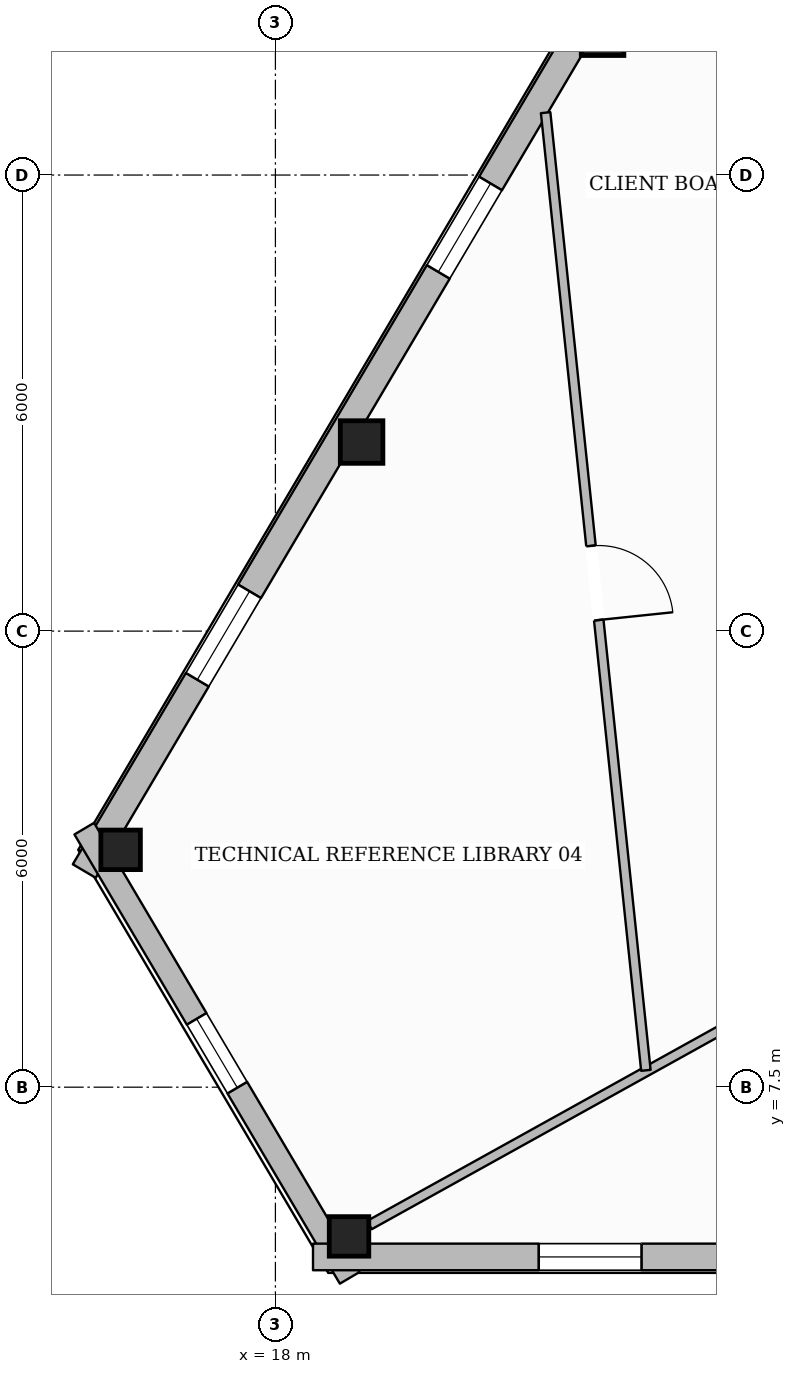
"""IFC4 building model, lengths in metres.
Left out: names, types, materials, properties, quantities, classifications, styles, units other than length and angle.
Written with IfcOpenShell. Run it as: python <this file> out.ifc"""

import sys

from ifc_helpers import new_model, si_unit, direction, frame, frame_2d, origin, origin_2d, place, context, subcontext, project, spatial, rectangle, hollow_rectangle, extrude, element, fill, save


model = new_model("IFC4")
c1 = context("Model", 3, precision=1e-05, world=origin(), true_north=direction((0.0, 1.0)))
c2 = subcontext(c1, "Body", "Model", "MODEL_VIEW")
j1 = project(units=[si_unit("LENGTHUNIT", "METRE"), si_unit("PLANEANGLEUNIT", "RADIAN")], contexts=[c1])
p1 = place(None, origin())
s1 = spatial("IfcSite", under=j1, at=p1, CompositionType="ELEMENT")
p2 = place(p1, origin())
s2 = spatial("IfcBuilding", under=s1, at=p2, CompositionType="ELEMENT")
p3 = place(p2, frame((0.0, 0.0, 274.15)))
s3 = spatial("IfcBuildingStorey", under=s2, at=p3, CompositionType="ELEMENT", Elevation=274.15)
for number, where, z_axis, x_axis in (
    (1, (22.304, 21.353, 0.0), (0.0, 0.0, 1.0), (1.0, 0.0, 0.0)),
    (2, (19.134, 15.988, 0.0), (0.0, 0.0, 1.0), (1.0, 0.0, 0.0)),
):
    element("IfcColumn", number, at=place(p3, frame(where, z_axis=z_axis, x_axis=x_axis)), inside=s3, PredefinedType="COLUMN", context=c2, shape_type="SweptSolid", body=[
        extrude(hollow_rectangle(XDim=0.56, YDim=0.56, WallThickness=0.025, at=origin_2d()), origin(), (0.0, 0.0, 1.0), 3.61),
    ])
for number, where, z_axis, x_axis in (
    (3, (15.964, 10.622, 0.0), (0.0, 0.0, 1.0), (1.0, 0.0, 0.0)),
    (4, (18.969, 5.537, 0.0), (0.0, 0.0, 1.0), (1.0, 0.0, 0.0)),
):
    element("IfcColumn", number, at=place(p3, frame(where, z_axis=z_axis, x_axis=x_axis)), inside=s3, PredefinedType="COLUMN", context=c2, shape_type="SweptSolid", body=[
        extrude(hollow_rectangle(XDim=0.52, YDim=0.52, WallThickness=0.024, at=origin_2d()), origin(), (0.0, 0.0, 1.0), 3.61),
    ])
p4 = place(p3, frame((15.485, 10.343, 0.0), z_axis=(0.0, 0.0, 1.0), x_axis=(0.508715156146, 0.860934892955, 0.0)))
e5 = element("IfcWall", 5, at=p4, inside=s3, PredefinedType="STANDARD", context=c2, shape_type="SweptSolid", body=[
    extrude(rectangle(XDim=38.349, YDim=0.35, at=frame_2d((19.175, 0.0))), origin(), (0.0, 0.0, 1.0), 3.196),
])
p5 = place(p4, frame((34.084, 0.0, 0.65)))
e6 = element("IfcOpeningElement", 6, at=p5, cuts=e5, PredefinedType="OPENING", context=c2, shape_type="SweptSolid", body=[
    extrude(rectangle(XDim=1.35, YDim=1.75, at=frame_2d((0.675, 0.875))), frame((0.0, 0.185, 0.0), z_axis=(0.0, -1.0, 0.0), x_axis=(1.0, 0.0, 0.0)), (0.0, 0.0, 1.0), 0.37),
])
p6 = place(p4, frame((27.852, 0.0, 0.65)))
e7 = element("IfcOpeningElement", 7, at=p6, cuts=e5, PredefinedType="OPENING", context=c2, shape_type="SweptSolid", body=[
    extrude(rectangle(XDim=1.35, YDim=1.75, at=frame_2d((0.675, 0.875))), frame((0.0, 0.185, 0.0), z_axis=(0.0, -1.0, 0.0), x_axis=(1.0, 0.0, 0.0)), (0.0, 0.0, 1.0), 0.37),
])
p7 = place(p4, frame((15.388, 0.0, 0.65)))
e8 = element("IfcOpeningElement", 8, at=p7, cuts=e5, PredefinedType="OPENING", context=c2, shape_type="SweptSolid", body=[
    extrude(rectangle(XDim=1.35, YDim=1.75, at=frame_2d((0.675, 0.875))), frame((0.0, 0.185, 0.0), z_axis=(0.0, -1.0, 0.0), x_axis=(1.0, 0.0, 0.0)), (0.0, 0.0, 1.0), 0.37),
])
p8 = place(p4, frame((9.156, 0.0, 0.65)))
e9 = element("IfcOpeningElement", 9, at=p8, cuts=e5, PredefinedType="OPENING", context=c2, shape_type="SweptSolid", body=[
    extrude(rectangle(XDim=1.35, YDim=1.75, at=frame_2d((0.675, 0.875))), frame((0.0, 0.185, 0.0), z_axis=(0.0, -1.0, 0.0), x_axis=(1.0, 0.0, 0.0)), (0.0, 0.0, 1.0), 0.37),
])
p9 = place(p4, frame((2.925, 0.0, 0.65)))
e10 = element("IfcOpeningElement", 10, at=p9, cuts=e5, PredefinedType="OPENING", context=c2, shape_type="SweptSolid", body=[
    extrude(rectangle(XDim=1.35, YDim=1.75, at=frame_2d((0.675, 0.875))), frame((0.0, 0.185, 0.0), z_axis=(0.0, -1.0, 0.0), x_axis=(1.0, 0.0, 0.0)), (0.0, 0.0, 1.0), 0.37),
])
p10 = place(p3, frame((18.977, 4.991, 0.0), z_axis=(0.0, 0.0, 1.0), x_axis=(-0.508725717469, 0.86092865232, 0.0)))
e11 = element("IfcWall", 11, at=p10, inside=s3, PredefinedType="STANDARD", context=c2, shape_type="SweptSolid", body=[
    extrude(rectangle(XDim=6.865, YDim=0.3, at=frame_2d((3.432, 0.0))), origin(), (0.0, 0.0, 1.0), 3.196),
])
p11 = place(p10, frame((2.907, 0.0, 0.65)))
e12 = element("IfcOpeningElement", 12, at=p11, cuts=e11, PredefinedType="OPENING", context=c2, shape_type="SweptSolid", body=[
    extrude(rectangle(XDim=1.05, YDim=1.7, at=frame_2d((0.525, 0.85))), frame((0.0, 0.16, 0.0), z_axis=(0.0, -1.0, 0.0), x_axis=(1.0, 0.0, 0.0)), (0.0, 0.0, 1.0), 0.32),
])
p12 = place(p3, frame((57.505, 5.267, 0.0), z_axis=(0.0, 0.0, 1.0), x_axis=(-1.0, 0.0, 0.0)))
e13 = element("IfcWall", 13, at=p12, inside=s3, PredefinedType="STANDARD", context=c2, shape_type="SweptSolid", body=[
    extrude(rectangle(XDim=39.011, YDim=0.35, at=frame_2d((19.505, 0.0))), origin(), (0.0, 0.0, 1.0), 3.196),
])
p13 = place(p12, frame((34.69, 0.0, 0.65)))
e14 = element("IfcOpeningElement", 14, at=p13, cuts=e13, PredefinedType="OPENING", context=c2, shape_type="SweptSolid", body=[
    extrude(rectangle(XDim=1.35, YDim=1.75, at=frame_2d((0.675, 0.875))), frame((0.0, 0.185, 0.0), z_axis=(0.0, -1.0, 0.0), x_axis=(1.0, 0.0, 0.0)), (0.0, 0.0, 1.0), 0.37),
])
p14 = place(p12, frame((28.346, 0.0, 0.65)))
e15 = element("IfcOpeningElement", 15, at=p14, cuts=e13, PredefinedType="OPENING", context=c2, shape_type="SweptSolid", body=[
    extrude(rectangle(XDim=1.35, YDim=1.75, at=frame_2d((0.675, 0.875))), frame((0.0, 0.185, 0.0), z_axis=(0.0, -1.0, 0.0), x_axis=(1.0, 0.0, 0.0)), (0.0, 0.0, 1.0), 0.37),
])
p15 = place(p12, frame((15.658, 0.0, 0.65)))
e16 = element("IfcOpeningElement", 16, at=p15, cuts=e13, PredefinedType="OPENING", context=c2, shape_type="SweptSolid", body=[
    extrude(rectangle(XDim=1.35, YDim=1.75, at=frame_2d((0.675, 0.875))), frame((0.0, 0.185, 0.0), z_axis=(0.0, -1.0, 0.0), x_axis=(1.0, 0.0, 0.0)), (0.0, 0.0, 1.0), 0.37),
])
p16 = place(p12, frame((9.315, 0.0, 0.65)))
e17 = element("IfcOpeningElement", 17, at=p16, cuts=e13, PredefinedType="OPENING", context=c2, shape_type="SweptSolid", body=[
    extrude(rectangle(XDim=1.35, YDim=1.75, at=frame_2d((0.675, 0.875))), frame((0.0, 0.185, 0.0), z_axis=(0.0, -1.0, 0.0), x_axis=(1.0, 0.0, 0.0)), (0.0, 0.0, 1.0), 0.37),
])
p17 = place(p12, frame((2.971, 0.0, 0.65)))
e18 = element("IfcOpeningElement", 18, at=p17, cuts=e13, PredefinedType="OPENING", context=c2, shape_type="SweptSolid", body=[
    extrude(rectangle(XDim=1.35, YDim=1.75, at=frame_2d((0.675, 0.875))), frame((0.0, 0.185, 0.0), z_axis=(0.0, -1.0, 0.0), x_axis=(1.0, 0.0, 0.0)), (0.0, 0.0, 1.0), 0.37),
])
p18 = place(p3, frame((26.01, 9.445, 0.0), z_axis=(0.0, 0.0, 1.0), x_axis=(-0.874347500964, -0.485300368389, 0.0)))
e19 = element("IfcWall", 19, at=p18, inside=s3, PredefinedType="PARTITIONING", context=c2, shape_type="SweptSolid", body=[
    extrude(rectangle(XDim=7.746, YDim=0.125, at=frame_2d((3.873, 0.0))), origin(), (0.0, 0.0, 1.0), 3.246),
])
p19 = place(p3, frame((21.555, 20.321, 0.0), z_axis=(0.0, 0.0, 1.0), x_axis=(0.104108921444, -0.994565901525, 0.0)))
e20 = element("IfcWall", 20, at=p19, inside=s3, PredefinedType="PARTITIONING", context=c2, shape_type="SweptSolid", body=[
    extrude(rectangle(XDim=12.668, YDim=0.125, at=frame_2d((6.334, 0.0))), origin(), (0.0, 0.0, 1.0), 3.349),
])
p20 = place(p19, frame((5.731, 0.0, 0.0)))
e21 = element("IfcOpeningElement", 21, at=p20, cuts=e20, PredefinedType="OPENING", context=c2, shape_type="SweptSolid", body=[
    extrude(rectangle(XDim=0.98, YDim=2.15, at=frame_2d((0.49, 1.075))), frame((0.0, 0.073, 0.0), z_axis=(0.0, -1.0, 0.0), x_axis=(1.0, 0.0, 0.0)), (0.0, 0.0, 1.0), 0.145),
])
p21 = place(p8, origin())
e22 = element("IfcWindow", 22, at=p21, inside=s3, PartitioningType="SINGLE_PANEL", PredefinedType="WINDOW", context=c2, shape_type="SweptSolid", body=[
    extrude(rectangle(XDim=1.35, YDim=1.75, at=frame_2d((0.675, 0.875))), frame((0.0, 0.03, 0.0), z_axis=(0.0, -1.0, 0.0), x_axis=(1.0, 0.0, 0.0)), (0.0, 0.0, 1.0), 0.06),
])
fill(e9, e22)
p22 = place(p9, origin())
e23 = element("IfcWindow", 23, at=p22, inside=s3, PartitioningType="SINGLE_PANEL", PredefinedType="WINDOW", context=c2, shape_type="SweptSolid", body=[
    extrude(rectangle(XDim=1.35, YDim=1.75, at=frame_2d((0.675, 0.875))), frame((0.0, 0.03, 0.0), z_axis=(0.0, -1.0, 0.0), x_axis=(1.0, 0.0, 0.0)), (0.0, 0.0, 1.0), 0.06),
])
fill(e10, e23)
p23 = place(p13, origin())
e24 = element("IfcWindow", 24, at=p23, inside=s3, PartitioningType="SINGLE_PANEL", PredefinedType="WINDOW", context=c2, shape_type="SweptSolid", body=[
    extrude(rectangle(XDim=1.35, YDim=1.75, at=frame_2d((0.675, 0.875))), frame((0.0, 0.03, 0.0), z_axis=(0.0, -1.0, 0.0), x_axis=(1.0, 0.0, 0.0)), (0.0, 0.0, 1.0), 0.06),
])
fill(e14, e24)
p24 = place(p11, origin())
e25 = element("IfcWindow", 25, at=p24, inside=s3, PartitioningType="SINGLE_PANEL", PredefinedType="WINDOW", context=c2, shape_type="SweptSolid", body=[
    extrude(rectangle(XDim=1.05, YDim=1.7, at=frame_2d((0.525, 0.85))), frame((0.0, 0.03, 0.0), z_axis=(0.0, -1.0, 0.0), x_axis=(1.0, 0.0, 0.0)), (0.0, 0.0, 1.0), 0.06),
])
fill(e12, e25)
p25 = place(p20, origin())
e26 = element("IfcDoor", 26, at=p25, inside=s3, OperationType="SINGLE_SWING_RIGHT", PredefinedType="DOOR", context=c2, shape_type="SweptSolid", body=[
    extrude(rectangle(XDim=0.98, YDim=2.15, at=frame_2d((0.49, 1.075))), frame((0.0, 0.025, 0.0), z_axis=(0.0, -1.0, 0.0), x_axis=(1.0, 0.0, 0.0)), (0.0, 0.0, 1.0), 0.05),
])
fill(e21, e26)
save(model, sys.argv[1])
